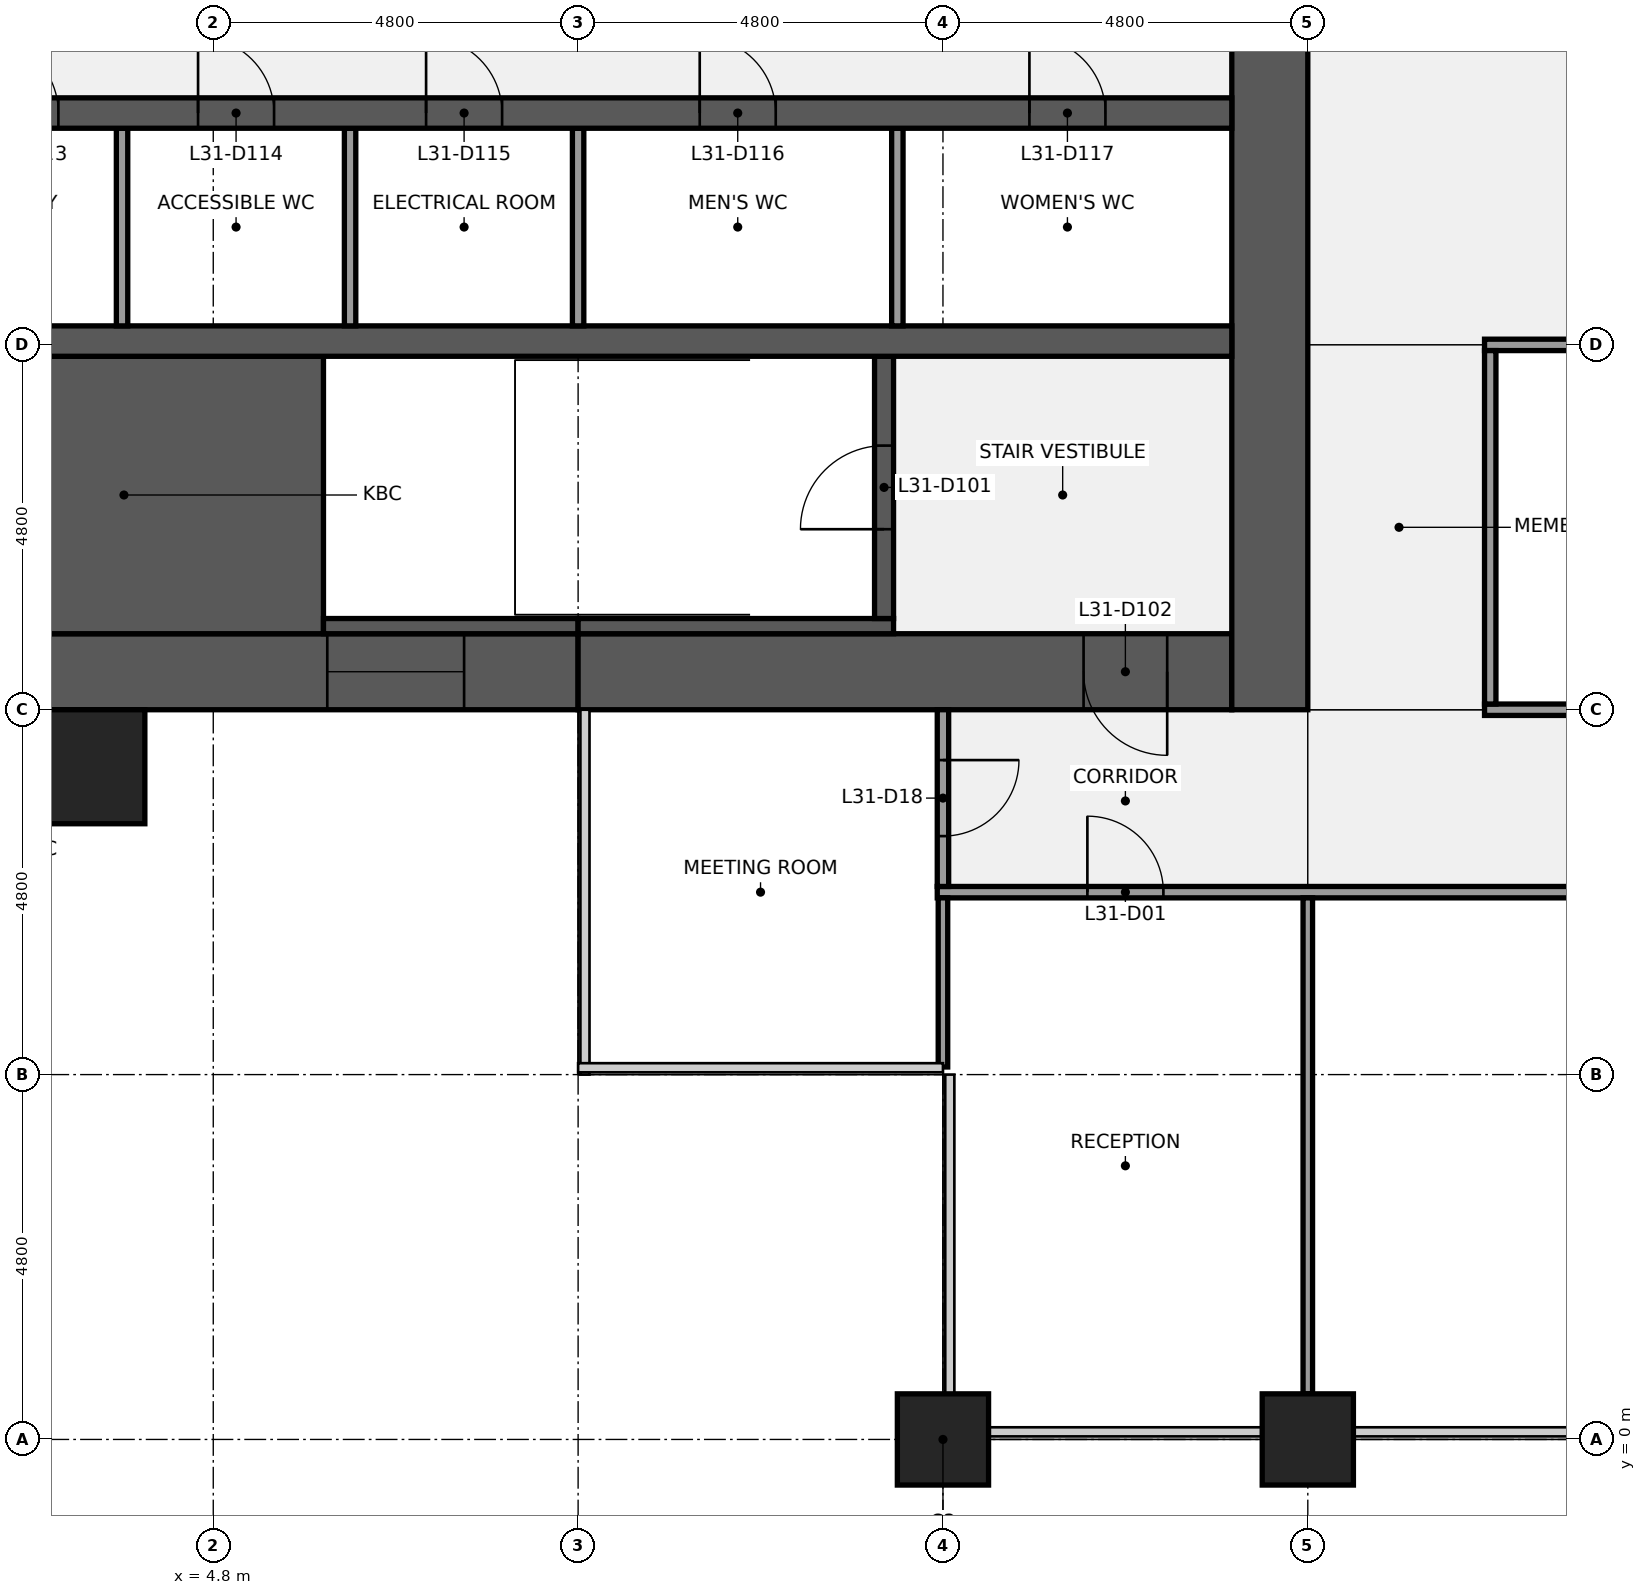
"""IFC4 building model, lengths in metres.
Left out: names, types, materials, properties, quantities, classifications, styles, units other than length and angle.
Written with IfcOpenShell. Run it as: python <this file> out.ifc"""

import sys

from ifc_helpers import new_model, si_unit, direction, frame, frame_2d, origin, origin_2d, place, context, subcontext, project, spatial, rectangle, extrude, element, fill, save


model = new_model("IFC4")
c1 = context("Model", 3, precision=1e-05, world=origin(), true_north=direction((0.0, 1.0)))
c2 = subcontext(c1, "Body", "Model", "MODEL_VIEW")
j1 = project(units=[si_unit("LENGTHUNIT", "METRE"), si_unit("PLANEANGLEUNIT", "RADIAN")], contexts=[c1])
p1 = place(None, origin())
s1 = spatial("IfcSite", under=j1, at=p1, CompositionType="ELEMENT")
p2 = place(p1, origin())
s2 = spatial("IfcBuilding", under=s1, at=p2, CompositionType="ELEMENT")
p3 = place(p2, frame((0.0, 0.0, 144.1)))
s3 = spatial("IfcBuildingStorey", under=s2, at=p3, CompositionType="ELEMENT", Elevation=144.1)
for number, where, z_axis, x_axis in (
    (1, (14.4, 0.0, 0.0), (0.0, 0.0, 1.0), (1.0, 0.0, 0.0)),
    (2, (19.2, 0.0, 0.0), (0.0, 0.0, 1.0), (1.0, 0.0, 0.0)),
):
    element("IfcColumn", number, at=place(p3, frame(where, z_axis=z_axis, x_axis=x_axis)), inside=s3, PredefinedType="COLUMN", context=c2, shape_type="SweptSolid", body=[
        extrude(rectangle(XDim=1.2, YDim=1.2, at=origin_2d()), origin(), (0.0, 0.0, 1.0), 4.0),
    ])
p4 = place(p3, frame((9.6, 10.1, 0.0), z_axis=(0.0, 0.0, 1.0), x_axis=(-1.0, 0.0, 0.0)))
e3 = element("IfcWall", 3, at=p4, inside=s3, PredefinedType="SHEAR", context=c2, shape_type="SweptSolid", body=[
    extrude(rectangle(XDim=8.6, YDim=1.0, at=frame_2d((4.3, 0.0))), origin(), (0.0, 0.0, 1.0), 3.84),
])
p5 = place(p4, frame((1.5, 0.0, 0.9)))
e4 = element("IfcOpeningElement", 4, at=p5, cuts=e3, PredefinedType="OPENING", context=c2, shape_type="SweptSolid", body=[
    extrude(rectangle(XDim=1.8, YDim=1.5, at=frame_2d((0.9, 0.75))), frame((0.0, 0.51, 0.0), z_axis=(0.0, -1.0, 0.0), x_axis=(1.0, 0.0, 0.0)), (0.0, 0.0, 1.0), 1.02),
])
p6 = place(p3, frame((18.2, 10.1, 0.0), z_axis=(0.0, 0.0, 1.0), x_axis=(-1.0, 0.0, 0.0)))
e5 = element("IfcWall", 5, at=p6, inside=s3, PredefinedType="SHEAR", context=c2, shape_type="SweptSolid", body=[
    extrude(rectangle(XDim=8.6, YDim=1.0, at=frame_2d((4.3, 0.0))), origin(), (0.0, 0.0, 1.0), 3.84),
])
p7 = place(p6, frame((0.85, 0.0, 0.0)))
e6 = element("IfcOpeningElement", 6, at=p7, cuts=e5, PredefinedType="OPENING", context=c2, shape_type="SweptSolid", body=[
    extrude(rectangle(XDim=1.1, YDim=2.1, at=frame_2d((0.55, 1.05))), frame((0.0, 0.51, 0.0), z_axis=(0.0, -1.0, 0.0), x_axis=(1.0, 0.0, 0.0)), (0.0, 0.0, 1.0), 1.02),
])
p8 = place(p3, frame((18.7, 38.4, 0.0), z_axis=(0.0, 0.0, 1.0), x_axis=(0.0, -1.0, 0.0)))
e7 = element("IfcWall", 7, at=p8, inside=s3, PredefinedType="SHEAR", context=c2, shape_type="SweptSolid", body=[
    extrude(rectangle(XDim=28.8, YDim=1.0, at=frame_2d((14.4, 0.0))), origin(), (0.0, 0.0, 1.0), 3.84),
])
p9 = place(p8, frame((18.3, 0.0, 0.0)))
e8 = element("IfcOpeningElement", 8, at=p9, cuts=e7, PredefinedType="OPENING", context=c2, shape_type="SweptSolid", body=[
    extrude(rectangle(XDim=1.8, YDim=2.1, at=frame_2d((0.9, 1.05))), frame((0.0, 0.51, 0.0), z_axis=(0.0, -1.0, 0.0), x_axis=(1.0, 0.0, 0.0)), (0.0, 0.0, 1.0), 1.02),
])
p10 = place(p8, frame((8.7, 0.0, 0.0)))
e9 = element("IfcOpeningElement", 9, at=p10, cuts=e7, PredefinedType="OPENING", context=c2, shape_type="SweptSolid", body=[
    extrude(rectangle(XDim=1.8, YDim=2.1, at=frame_2d((0.9, 1.05))), frame((0.0, 0.51, 0.0), z_axis=(0.0, -1.0, 0.0), x_axis=(1.0, 0.0, 0.0)), (0.0, 0.0, 1.0), 1.02),
])
p11 = place(p3, frame((1.0, 12.425, 0.0), z_axis=(0.0, 0.0, 1.0), x_axis=(1.0, 0.0, 0.0)))
e10 = element("IfcWall", 10, at=p11, inside=s3, PredefinedType="SHEAR", context=c2, shape_type="SweptSolid", body=[
    extrude(rectangle(XDim=5.25, YDim=3.65, at=frame_2d((2.625, 0.0))), origin(), (0.0, 0.0, 1.0), 3.84),
])
p12 = place(p3, frame((6.25, 10.7, 0.0), z_axis=(0.0, 0.0, 1.0), x_axis=(1.0, 0.0, 0.0)))
e11 = element("IfcWall", 11, at=p12, inside=s3, PredefinedType="SHEAR", context=c2, shape_type="SweptSolid", body=[
    extrude(rectangle(XDim=3.35, YDim=0.2, at=frame_2d((1.675, 0.0))), origin(), (0.0, 0.0, 1.0), 3.84),
])
p13 = place(p3, frame((9.6, 10.7, 0.0), z_axis=(0.0, 0.0, 1.0), x_axis=(1.0, 0.0, 0.0)))
e12 = element("IfcWall", 12, at=p13, inside=s3, PredefinedType="SHEAR", context=c2, shape_type="SweptSolid", body=[
    extrude(rectangle(XDim=4.15, YDim=0.2, at=frame_2d((2.075, 0.0))), origin(), (0.0, 0.0, 1.0), 3.84),
])
p14 = place(p3, frame((13.625, 10.8, 0.0), z_axis=(0.0, 0.0, 1.0), x_axis=(0.0, 1.0, 0.0)))
e13 = element("IfcWall", 13, at=p14, inside=s3, PredefinedType="SHEAR", context=c2, shape_type="SweptSolid", body=[
    extrude(rectangle(XDim=3.45, YDim=0.25, at=frame_2d((1.725, 0.0))), origin(), (0.0, 0.0, 1.0), 3.84),
])
p15 = place(p14, frame((1.175, 0.0, 0.0)))
e14 = element("IfcOpeningElement", 14, at=p15, cuts=e13, PredefinedType="OPENING", context=c2, shape_type="SweptSolid", body=[
    extrude(rectangle(XDim=1.1, YDim=2.1, at=frame_2d((0.55, 1.05))), frame((0.0, 0.135, 0.0), z_axis=(0.0, -1.0, 0.0), x_axis=(1.0, 0.0, 0.0)), (0.0, 0.0, 1.0), 0.27),
])
p16 = place(p3, frame((1.0, 14.45, 0.0), z_axis=(0.0, 0.0, 1.0), x_axis=(1.0, 0.0, 0.0)))
e15 = element("IfcWall", 15, at=p16, inside=s3, PredefinedType="SHEAR", context=c2, shape_type="SweptSolid", body=[
    extrude(rectangle(XDim=17.2, YDim=0.4, at=frame_2d((8.6, 0.0))), origin(), (0.0, 0.0, 1.0), 3.84),
])
for number, where, z_axis, x_axis in (
    (16, (3.6, 14.65, 0.0), (0.0, 0.0, 1.0), (0.0, 1.0, 0.0)),
    (17, (6.6, 14.65, 0.0), (0.0, 0.0, 1.0), (0.0, 1.0, 0.0)),
    (18, (9.6, 14.65, 0.0), (0.0, 0.0, 1.0), (0.0, 1.0, 0.0)),
    (19, (13.8, 14.65, 0.0), (0.0, 0.0, 1.0), (0.0, 1.0, 0.0)),
):
    element("IfcWall", number, at=place(p3, frame(where, z_axis=z_axis, x_axis=x_axis)), inside=s3, PredefinedType="PARTITIONING", context=c2, shape_type="SweptSolid", body=[
        extrude(rectangle(XDim=2.6, YDim=0.15, at=frame_2d((1.3, 0.0))), origin(), (0.0, 0.0, 1.0), 3.84),
    ])
p17 = place(p3, frame((1.0, 17.45, 0.0), z_axis=(0.0, 0.0, 1.0), x_axis=(1.0, 0.0, 0.0)))
e20 = element("IfcWall", 20, at=p17, inside=s3, PredefinedType="SHEAR", context=c2, shape_type="SweptSolid", body=[
    extrude(rectangle(XDim=17.2, YDim=0.4, at=frame_2d((8.6, 0.0))), origin(), (0.0, 0.0, 1.0), 3.84),
])
p18 = place(p17, frame((0.762, 0.0, 0.0)))
e21 = element("IfcOpeningElement", 21, at=p18, cuts=e20, PredefinedType="OPENING", context=c2, shape_type="SweptSolid", body=[
    extrude(rectangle(XDim=1.0, YDim=2.1, at=frame_2d((0.5, 1.05))), frame((0.0, 0.21, 0.0), z_axis=(0.0, -1.0, 0.0), x_axis=(1.0, 0.0, 0.0)), (0.0, 0.0, 1.0), 0.42),
])
p19 = place(p17, frame((3.6, 0.0, 0.0)))
e22 = element("IfcOpeningElement", 22, at=p19, cuts=e20, PredefinedType="OPENING", context=c2, shape_type="SweptSolid", body=[
    extrude(rectangle(XDim=1.0, YDim=2.1, at=frame_2d((0.5, 1.05))), frame((0.0, 0.21, 0.0), z_axis=(0.0, -1.0, 0.0), x_axis=(1.0, 0.0, 0.0)), (0.0, 0.0, 1.0), 0.42),
])
p20 = place(p17, frame((6.6, 0.0, 0.0)))
e23 = element("IfcOpeningElement", 23, at=p20, cuts=e20, PredefinedType="OPENING", context=c2, shape_type="SweptSolid", body=[
    extrude(rectangle(XDim=1.0, YDim=2.1, at=frame_2d((0.5, 1.05))), frame((0.0, 0.21, 0.0), z_axis=(0.0, -1.0, 0.0), x_axis=(1.0, 0.0, 0.0)), (0.0, 0.0, 1.0), 0.42),
])
p21 = place(p17, frame((10.2, 0.0, 0.0)))
e24 = element("IfcOpeningElement", 24, at=p21, cuts=e20, PredefinedType="OPENING", context=c2, shape_type="SweptSolid", body=[
    extrude(rectangle(XDim=1.0, YDim=2.1, at=frame_2d((0.5, 1.05))), frame((0.0, 0.21, 0.0), z_axis=(0.0, -1.0, 0.0), x_axis=(1.0, 0.0, 0.0)), (0.0, 0.0, 1.0), 0.42),
])
p22 = place(p17, frame((14.538, 0.0, 0.0)))
e25 = element("IfcOpeningElement", 25, at=p22, cuts=e20, PredefinedType="OPENING", context=c2, shape_type="SweptSolid", body=[
    extrude(rectangle(XDim=1.0, YDim=2.1, at=frame_2d((0.5, 1.05))), frame((0.0, 0.21, 0.0), z_axis=(0.0, -1.0, 0.0), x_axis=(1.0, 0.0, 0.0)), (0.0, 0.0, 1.0), 0.42),
])
p23 = place(p3, frame((14.325, 7.2, 0.0), z_axis=(0.0, 0.0, 1.0), x_axis=(1.0, 0.0, 0.0)))
e26 = element("IfcWall", 26, at=p23, inside=s3, PredefinedType="PARTITIONING", context=c2, shape_type="SweptSolid", body=[
    extrude(rectangle(XDim=28.95, YDim=0.15, at=frame_2d((14.475, 0.0))), origin(), (0.0, 0.0, 1.0), 2.936),
])
p24 = place(p23, frame((1.975, 0.0, 0.0)))
e27 = element("IfcOpeningElement", 27, at=p24, cuts=e26, PredefinedType="OPENING", context=c2, shape_type="SweptSolid", body=[
    extrude(rectangle(XDim=1.0, YDim=2.1, at=frame_2d((0.5, 1.05))), frame((0.0, 0.085, 0.0), z_axis=(0.0, -1.0, 0.0), x_axis=(1.0, 0.0, 0.0)), (0.0, 0.0, 1.0), 0.17),
])
p25 = place(p23, frame((13.975, 0.0, 0.0)))
e28 = element("IfcOpeningElement", 28, at=p25, cuts=e26, PredefinedType="OPENING", context=c2, shape_type="SweptSolid", body=[
    extrude(rectangle(XDim=1.0, YDim=2.1, at=frame_2d((0.5, 1.05))), frame((0.0, 0.085, 0.0), z_axis=(0.0, -1.0, 0.0), x_axis=(1.0, 0.0, 0.0)), (0.0, 0.0, 1.0), 0.17),
])
p26 = place(p23, frame((25.975, 0.0, 0.0)))
e29 = element("IfcOpeningElement", 29, at=p26, cuts=e26, PredefinedType="OPENING", context=c2, shape_type="SweptSolid", body=[
    extrude(rectangle(XDim=1.0, YDim=2.1, at=frame_2d((0.5, 1.05))), frame((0.0, 0.085, 0.0), z_axis=(0.0, -1.0, 0.0), x_axis=(1.0, 0.0, 0.0)), (0.0, 0.0, 1.0), 0.17),
])
p27 = place(p3, frame((21.525, 9.6, 0.0), z_axis=(0.0, 0.0, 1.0), x_axis=(1.0, 0.0, 0.0)))
e30 = element("IfcWall", 30, at=p27, inside=s3, PredefinedType="PARTITIONING", context=c2, shape_type="SweptSolid", body=[
    extrude(rectangle(XDim=14.55, YDim=0.15, at=frame_2d((7.275, 0.0))), origin(), (0.0, 0.0, 1.0), 2.936),
])
p28 = place(p27, frame((2.575, 0.0, 0.0)))
e31 = element("IfcOpeningElement", 31, at=p28, cuts=e30, PredefinedType="OPENING", context=c2, shape_type="SweptSolid", body=[
    extrude(rectangle(XDim=1.0, YDim=2.1, at=frame_2d((0.5, 1.05))), frame((0.0, 0.085, 0.0), z_axis=(0.0, -1.0, 0.0), x_axis=(1.0, 0.0, 0.0)), (0.0, 0.0, 1.0), 0.17),
])
p29 = place(p27, frame((9.775, 0.0, 0.0)))
e32 = element("IfcOpeningElement", 32, at=p29, cuts=e30, PredefinedType="OPENING", context=c2, shape_type="SweptSolid", body=[
    extrude(rectangle(XDim=1.0, YDim=2.1, at=frame_2d((0.5, 1.05))), frame((0.0, 0.085, 0.0), z_axis=(0.0, -1.0, 0.0), x_axis=(1.0, 0.0, 0.0)), (0.0, 0.0, 1.0), 0.17),
])
p30 = place(p3, frame((21.525, 14.4, 0.0), z_axis=(0.0, 0.0, 1.0), x_axis=(1.0, 0.0, 0.0)))
e33 = element("IfcWall", 33, at=p30, inside=s3, PredefinedType="PARTITIONING", context=c2, shape_type="SweptSolid", body=[
    extrude(rectangle(XDim=2.55, YDim=0.15, at=frame_2d((1.275, 0.0))), origin(), (0.0, 0.0, 1.0), 2.936),
])
p31 = place(p3, frame((14.4, 4.9, 0.0), z_axis=(0.0, 0.0, 1.0), x_axis=(0.0, 1.0, 0.0)))
e34 = element("IfcWall", 34, at=p31, inside=s3, PredefinedType="PARTITIONING", context=c2, shape_type="SweptSolid", body=[
    extrude(rectangle(XDim=2.225, YDim=0.125, at=frame_2d((1.113, 0.0))), origin(), (0.0, 0.0, 1.0), 2.936),
])
p32 = place(p3, frame((14.4, 7.275, 0.0), z_axis=(0.0, 0.0, 1.0), x_axis=(0.0, 1.0, 0.0)))
e35 = element("IfcWall", 35, at=p32, inside=s3, PredefinedType="PARTITIONING", context=c2, shape_type="SweptSolid", body=[
    extrude(rectangle(XDim=2.325, YDim=0.15, at=frame_2d((1.163, 0.0))), origin(), (0.0, 0.0, 1.0), 2.936),
])
p33 = place(p32, frame((0.663, 0.0, 0.0)))
e36 = element("IfcOpeningElement", 36, at=p33, cuts=e35, PredefinedType="OPENING", context=c2, shape_type="SweptSolid", body=[
    extrude(rectangle(XDim=1.0, YDim=2.1, at=frame_2d((0.5, 1.05))), frame((0.0, 0.085, 0.0), z_axis=(0.0, -1.0, 0.0), x_axis=(1.0, 0.0, 0.0)), (0.0, 0.0, 1.0), 0.17),
])
p34 = place(p3, frame((19.2, 0.6, 0.0), z_axis=(0.0, 0.0, 1.0), x_axis=(0.0, 1.0, 0.0)))
e37 = element("IfcWall", 37, at=p34, inside=s3, PredefinedType="PARTITIONING", context=c2, shape_type="SweptSolid", body=[
    extrude(rectangle(XDim=6.525, YDim=0.125, at=frame_2d((3.262, 0.0))), origin(), (0.0, 0.0, 1.0), 2.936),
])
p35 = place(p3, frame((21.6, 9.675, 0.0), z_axis=(0.0, 0.0, 1.0), x_axis=(0.0, 1.0, 0.0)))
e38 = element("IfcWall", 38, at=p35, inside=s3, PredefinedType="PARTITIONING", context=c2, shape_type="SweptSolid", body=[
    extrude(rectangle(XDim=4.65, YDim=0.15, at=frame_2d((2.325, 0.0))), origin(), (0.0, 0.0, 1.0), 2.936),
])
p36 = place(p3, frame((2.4, 8.85, 0.0), z_axis=(0.0, 0.0, 1.0), x_axis=(1.0, 0.0, 0.0)))
e39 = element("IfcColumn", 39, at=p36, inside=s3, PredefinedType="PILASTER", context=c2, shape_type="SweptSolid", body=[
    extrude(rectangle(XDim=3.0, YDim=1.5, at=origin_2d()), origin(), (0.0, 0.0, 1.0), 4.0),
])
for number, where, z_axis, x_axis in (
    (40, (14.4, -1.05, 0.0), (0.0, 0.0, 1.0), (1.0, 0.0, 0.0)),
    (41, (19.2, -1.05, 0.0), (0.0, 0.0, 1.0), (1.0, 0.0, 0.0)),
):
    element("IfcColumn", number, at=place(p3, frame(where, z_axis=z_axis, x_axis=x_axis)), inside=s3, PredefinedType="PILASTER", context=c2, shape_type="SweptSolid", body=[
        extrude(rectangle(XDim=3.6, YDim=0.9, at=origin_2d()), origin(), (0.0, 0.0, 1.0), 4.0),
    ])
p37 = place(p15, origin())
e42 = element("IfcDoor", 42, at=p37, inside=s3, OperationType="SINGLE_SWING_LEFT", PredefinedType="DOOR", context=c2, shape_type="SweptSolid", body=[
    extrude(rectangle(XDim=1.1, YDim=2.1, at=frame_2d((0.55, 1.05))), frame((0.0, 0.025, 0.0), z_axis=(0.0, -1.0, 0.0), x_axis=(1.0, 0.0, 0.0)), (0.0, 0.0, 1.0), 0.05),
])
fill(e14, e42)
p38 = place(p7, origin())
e43 = element("IfcDoor", 43, at=p38, inside=s3, OperationType="SINGLE_SWING_LEFT", PredefinedType="DOOR", context=c2, shape_type="SweptSolid", body=[
    extrude(rectangle(XDim=1.1, YDim=2.1, at=frame_2d((0.55, 1.05))), frame((0.0, 0.025, 0.0), z_axis=(0.0, -1.0, 0.0), x_axis=(1.0, 0.0, 0.0)), (0.0, 0.0, 1.0), 0.05),
])
fill(e6, e43)
p39 = place(p18, origin())
e44 = element("IfcDoor", 44, at=p39, inside=s3, OperationType="SINGLE_SWING_LEFT", PredefinedType="DOOR", context=c2, shape_type="SweptSolid", body=[
    extrude(rectangle(XDim=1.0, YDim=2.1, at=frame_2d((0.5, 1.05))), frame((0.0, 0.025, 0.0), z_axis=(0.0, -1.0, 0.0), x_axis=(1.0, 0.0, 0.0)), (0.0, 0.0, 1.0), 0.05),
])
fill(e21, e44)
p40 = place(p19, origin())
e45 = element("IfcDoor", 45, at=p40, inside=s3, OperationType="SINGLE_SWING_LEFT", PredefinedType="DOOR", context=c2, shape_type="SweptSolid", body=[
    extrude(rectangle(XDim=1.0, YDim=2.1, at=frame_2d((0.5, 1.05))), frame((0.0, 0.025, 0.0), z_axis=(0.0, -1.0, 0.0), x_axis=(1.0, 0.0, 0.0)), (0.0, 0.0, 1.0), 0.05),
])
fill(e22, e45)
p41 = place(p20, origin())
e46 = element("IfcDoor", 46, at=p41, inside=s3, OperationType="SINGLE_SWING_LEFT", PredefinedType="DOOR", context=c2, shape_type="SweptSolid", body=[
    extrude(rectangle(XDim=1.0, YDim=2.1, at=frame_2d((0.5, 1.05))), frame((0.0, 0.025, 0.0), z_axis=(0.0, -1.0, 0.0), x_axis=(1.0, 0.0, 0.0)), (0.0, 0.0, 1.0), 0.05),
])
fill(e23, e46)
p42 = place(p21, origin())
e47 = element("IfcDoor", 47, at=p42, inside=s3, OperationType="SINGLE_SWING_LEFT", PredefinedType="DOOR", context=c2, shape_type="SweptSolid", body=[
    extrude(rectangle(XDim=1.0, YDim=2.1, at=frame_2d((0.5, 1.05))), frame((0.0, 0.025, 0.0), z_axis=(0.0, -1.0, 0.0), x_axis=(1.0, 0.0, 0.0)), (0.0, 0.0, 1.0), 0.05),
])
fill(e24, e47)
p43 = place(p22, origin())
e48 = element("IfcDoor", 48, at=p43, inside=s3, OperationType="SINGLE_SWING_LEFT", PredefinedType="DOOR", context=c2, shape_type="SweptSolid", body=[
    extrude(rectangle(XDim=1.0, YDim=2.1, at=frame_2d((0.5, 1.05))), frame((0.0, 0.025, 0.0), z_axis=(0.0, -1.0, 0.0), x_axis=(1.0, 0.0, 0.0)), (0.0, 0.0, 1.0), 0.05),
])
fill(e25, e48)
p44 = place(p5, origin())
e49 = element("IfcWindow", 49, at=p44, inside=s3, PartitioningType="SINGLE_PANEL", PredefinedType="WINDOW", context=c2, shape_type="SweptSolid", body=[
    extrude(rectangle(XDim=1.8, YDim=1.5, at=frame_2d((0.9, 0.75))), frame((0.0, 0.03, 0.0), z_axis=(0.0, -1.0, 0.0), x_axis=(1.0, 0.0, 0.0)), (0.0, 0.0, 1.0), 0.06),
])
fill(e4, e49)
p45 = place(p24, origin())
e50 = element("IfcDoor", 50, at=p45, inside=s3, OperationType="SINGLE_SWING_LEFT", PredefinedType="DOOR", context=c2, shape_type="SweptSolid", body=[
    extrude(rectangle(XDim=1.0, YDim=2.1, at=frame_2d((0.5, 1.05))), frame((0.0, 0.025, 0.0), z_axis=(0.0, -1.0, 0.0), x_axis=(1.0, 0.0, 0.0)), (0.0, 0.0, 1.0), 0.05),
])
fill(e27, e50)
p46 = place(p33, origin())
e51 = element("IfcDoor", 51, at=p46, inside=s3, OperationType="SINGLE_SWING_RIGHT", PredefinedType="DOOR", context=c2, shape_type="SweptSolid", body=[
    extrude(rectangle(XDim=1.0, YDim=2.1, at=frame_2d((0.5, 1.05))), frame((0.0, 0.025, 0.0), z_axis=(0.0, -1.0, 0.0), x_axis=(1.0, 0.0, 0.0)), (0.0, 0.0, 1.0), 0.05),
])
fill(e36, e51)
save(model, sys.argv[1])
